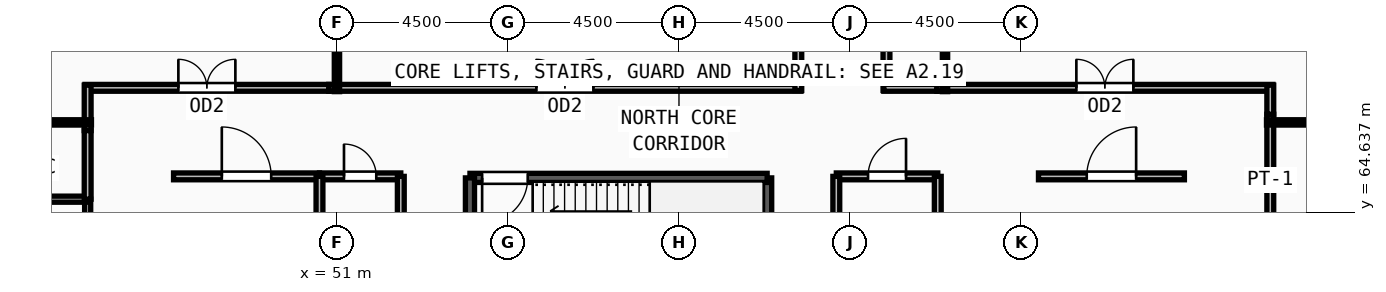
"""IFC4 building model, lengths in metres.
Left out: names, types, materials, properties, quantities, classifications, styles, units other than length and angle.
Written with IfcOpenShell. Run it as: python <this file> out.ifc"""

import sys

from ifc_helpers import new_model, si_unit, direction, frame, frame_2d, origin, place, context, subcontext, project, spatial, rectangle, extrude, source, transform, mapped, element, fill, save


model = new_model("IFC4")
c1 = context("Model", 3, precision=1e-05, world=origin(), true_north=direction((0.0, 1.0)))
c2 = subcontext(c1, "Body", "Model", "MODEL_VIEW")
j1 = project(units=[si_unit("LENGTHUNIT", "METRE"), si_unit("PLANEANGLEUNIT", "RADIAN")], contexts=[c1])
p1 = place(None, origin())
s1 = spatial("IfcSite", under=j1, at=p1, CompositionType="ELEMENT")
p2 = place(p1, origin())
s2 = spatial("IfcBuilding", under=s1, at=p2, CompositionType="ELEMENT")
p3 = place(p2, frame((0.0, 0.0, 194.25)))
s3 = spatial("IfcBuildingStorey", under=s2, at=p3, CompositionType="ELEMENT", Elevation=194.25)
p4 = place(p3, frame((62.32, 62.1, 0.0), z_axis=(0.0, 0.0, 1.0), x_axis=(0.0, 1.0, 0.0)))
e1 = element("IfcWall", 1, at=p4, inside=s3, PredefinedType="SOLIDWALL", context=c2, shape_type="SweptSolid", body=[
    extrude(rectangle(XDim=3.44, YDim=0.24, at=frame_2d((1.72, 0.0))), origin(), (0.0, 0.0, 1.0), 3.57),
])
p5 = place(p3, frame((62.32, 65.54, 0.0), z_axis=(0.0, 0.0, 1.0), x_axis=(-1.0, 0.0, 0.0)))
e2 = element("IfcWall", 2, at=p5, inside=s3, PredefinedType="SOLIDWALL", context=c2, shape_type="SweptSolid", body=[
    extrude(rectangle(XDim=7.82, YDim=0.24, at=frame_2d((3.91, 0.0))), origin(), (0.0, 0.0, 1.0), 3.57),
])
m1 = source(origin(), c2, "Body", "SweptSolid", [
    extrude(rectangle(XDim=1.2, YDim=2.2, at=frame_2d((0.6, 1.1))), frame((0.0, 0.13, 0.0), z_axis=(0.0, -1.0, 0.0), x_axis=(1.0, 0.0, 0.0)), (0.0, 0.0, 1.0), 0.26),
])
p6 = place(p5, frame((6.3, 0.0, 0.0)))
e3 = element("IfcOpeningElement", 3, at=p6, cuts=e2, PredefinedType="OPENING", context=c2, shape_type="MappedRepresentation", body=[
    mapped(m1, transform((0.0, 0.0, 0.0), x_axis=(1.0, 0.0, 0.0), y_axis=(0.0, 1.0, 0.0), z_axis=(0.0, 0.0, 1.0), scale=1.0)),
])
p7 = place(p3, frame((54.5, 65.54, 0.0), z_axis=(0.0, 0.0, 1.0), x_axis=(0.0, -1.0, 0.0)))
e4 = element("IfcWall", 4, at=p7, inside=s3, PredefinedType="SOLIDWALL", context=c2, shape_type="SweptSolid", body=[
    extrude(rectangle(XDim=3.44, YDim=0.24, at=frame_2d((1.72, 0.0))), origin(), (0.0, 0.0, 1.0), 3.57),
])
p8 = place(p3, frame((44.44, 62.24, 0.0), z_axis=(0.0, 0.0, 1.0), x_axis=(0.0, 1.0, 0.0)))
e5 = element("IfcWall", 5, at=p8, inside=s3, PredefinedType="PARTITIONING", context=c2, shape_type="SweptSolid", body=[
    extrude(rectangle(XDim=2.74, YDim=0.16, at=frame_2d((1.37, 0.0))), origin(), (0.0, 0.0, 1.0), 3.57),
])
m2 = source(origin(), c2, "Body", "SweptSolid", [
    extrude(rectangle(XDim=1.05, YDim=2.15, at=frame_2d((0.525, 1.075))), frame((0.0, 0.09, 0.0), z_axis=(0.0, -1.0, 0.0), x_axis=(1.0, 0.0, 0.0)), (0.0, 0.0, 1.0), 0.18),
])
p9 = place(p8, frame((0.845, 0.0, 0.0)))
e6 = element("IfcOpeningElement", 6, at=p9, cuts=e5, PredefinedType="OPENING", context=c2, shape_type="MappedRepresentation", body=[
    mapped(m2, transform((0.0, 0.0, 0.0), x_axis=(1.0, 0.0, 0.0), y_axis=(0.0, 1.0, 0.0), z_axis=(0.0, 0.0, 1.0), scale=1.0)),
])
p10 = place(p3, frame((50.54, 65.58, 0.0), z_axis=(0.0, 0.0, 1.0), x_axis=(1.0, 0.0, 0.0)))
e7 = element("IfcWall", 7, at=p10, inside=s3, PredefinedType="PARTITIONING", context=c2, shape_type="SweptSolid", body=[
    extrude(rectangle(XDim=2.14, YDim=0.18, at=frame_2d((1.07, 0.0))), origin(), (0.0, 0.0, 1.0), 3.57),
])
m3 = source(origin(), c2, "Body", "SweptSolid", [
    extrude(rectangle(XDim=0.85, YDim=2.1, at=frame_2d((0.425, 1.05))), frame((0.0, 0.1, 0.0), z_axis=(0.0, -1.0, 0.0), x_axis=(1.0, 0.0, 0.0)), (0.0, 0.0, 1.0), 0.2),
])
p11 = place(p10, frame((0.645, 0.0, 0.0)))
e8 = element("IfcOpeningElement", 8, at=p11, cuts=e7, PredefinedType="OPENING", context=c2, shape_type="MappedRepresentation", body=[
    mapped(m3, transform((0.0, 0.0, 0.0), x_axis=(1.0, 0.0, 0.0), y_axis=(0.0, 1.0, 0.0), z_axis=(0.0, 0.0, 1.0), scale=1.0)),
])
p12 = place(p3, frame((64.14, 65.58, 0.0), z_axis=(0.0, 0.0, 1.0), x_axis=(1.0, 0.0, 0.0)))
e9 = element("IfcWall", 9, at=p12, inside=s3, PredefinedType="PARTITIONING", context=c2, shape_type="SweptSolid", body=[
    extrude(rectangle(XDim=2.67, YDim=0.18, at=frame_2d((1.335, 0.0))), origin(), (0.0, 0.0, 1.0), 3.57),
])
m4 = source(origin(), c2, "Body", "SweptSolid", [
    extrude(rectangle(XDim=1.0, YDim=2.2, at=frame_2d((0.5, 1.1))), frame((0.0, 0.1, 0.0), z_axis=(0.0, -1.0, 0.0), x_axis=(1.0, 0.0, 0.0)), (0.0, 0.0, 1.0), 0.2),
])
p13 = place(p12, frame((0.835, 0.0, 0.0)))
e10 = element("IfcOpeningElement", 10, at=p13, cuts=e9, PredefinedType="OPENING", context=c2, shape_type="MappedRepresentation", body=[
    mapped(m4, transform((0.0, 0.0, 0.0), x_axis=(1.0, 0.0, 0.0), y_axis=(0.0, 1.0, 0.0), z_axis=(0.0, 0.0, 1.0), scale=1.0)),
])
p14 = place(p3, frame((46.7, 65.58, 0.0), z_axis=(0.0, 0.0, 1.0), x_axis=(1.0, 0.0, 0.0)))
e11 = element("IfcWall", 11, at=p14, inside=s3, PredefinedType="PARTITIONING", context=c2, shape_type="SweptSolid", body=[
    extrude(rectangle(XDim=3.84, YDim=0.18, at=frame_2d((1.92, 0.0))), origin(), (0.0, 0.0, 1.0), 3.57),
])
m5 = source(origin(), c2, "Body", "SweptSolid", [
    extrude(rectangle(XDim=1.3, YDim=2.2, at=frame_2d((0.65, 1.1))), frame((0.0, 0.1, 0.0), z_axis=(0.0, -1.0, 0.0), x_axis=(1.0, 0.0, 0.0)), (0.0, 0.0, 1.0), 0.2),
])
p15 = place(p14, frame((1.27, 0.0, 0.0)))
e12 = element("IfcOpeningElement", 12, at=p15, cuts=e11, PredefinedType="OPENING", context=c2, shape_type="MappedRepresentation", body=[
    mapped(m5, transform((0.0, 0.0, 0.0), x_axis=(1.0, 0.0, 0.0), y_axis=(0.0, 1.0, 0.0), z_axis=(0.0, 0.0, 1.0), scale=1.0)),
])
p16 = place(p3, frame((69.46, 65.58, 0.0), z_axis=(0.0, 0.0, 1.0), x_axis=(1.0, 0.0, 0.0)))
e13 = element("IfcWall", 13, at=p16, inside=s3, PredefinedType="PARTITIONING", context=c2, shape_type="SweptSolid", body=[
    extrude(rectangle(XDim=3.84, YDim=0.18, at=frame_2d((1.92, 0.0))), origin(), (0.0, 0.0, 1.0), 3.57),
])
p17 = place(p16, frame((1.27, 0.0, 0.0)))
e14 = element("IfcOpeningElement", 14, at=p17, cuts=e13, PredefinedType="OPENING", context=c2, shape_type="MappedRepresentation", body=[
    mapped(m5, transform((0.0, 0.0, 0.0), x_axis=(1.0, 0.0, 0.0), y_axis=(0.0, 1.0, 0.0), z_axis=(0.0, 0.0, 1.0), scale=1.0)),
])
p18 = place(p3, frame((75.56, 67.215, 0.0), z_axis=(0.0, 0.0, 1.0), x_axis=(0.0, -1.0, 0.0)))
e15 = element("IfcWall", 15, at=p18, inside=s3, PredefinedType="PARTITIONING", context=c2, shape_type="SweptSolid", body=[
    extrude(rectangle(XDim=8.93, YDim=0.18, at=frame_2d((4.465, 0.0))), origin(), (0.0, 0.0, 1.0), 3.57),
])
m6 = source(origin(), c2, "Body", "SweptSolid", [
    extrude(rectangle(XDim=1.5, YDim=2.2, at=frame_2d((0.75, 1.1))), frame((0.0, 0.1, 0.0), z_axis=(0.0, -1.0, 0.0), x_axis=(1.0, 0.0, 0.0)), (0.0, 0.0, 1.0), 0.2),
])
p19 = place(p18, frame((3.715, 0.0, 0.0)))
e16 = element("IfcOpeningElement", 16, at=p19, cuts=e15, PredefinedType="OPENING", context=c2, shape_type="MappedRepresentation", body=[
    mapped(m6, transform((0.0, 0.0, 0.0), x_axis=(1.0, 0.0, 0.0), y_axis=(0.0, 1.0, 0.0), z_axis=(0.0, 0.0, 1.0), scale=1.0)),
])
p20 = place(p3, frame((66.785, 67.91, 0.0), z_axis=(0.0, 0.0, 1.0), x_axis=(1.0, 0.0, 0.0)))
e17 = element("IfcWall", 17, at=p20, inside=s3, PredefinedType="PARTITIONING", context=c2, shape_type="SweptSolid", body=[
    extrude(rectangle(XDim=8.845, YDim=0.18, at=frame_2d((4.422, 0.0))), origin(), (0.0, 0.0, 1.0), 3.57),
])
p21 = place(p20, frame((3.672, 0.0, 0.0)))
e18 = element("IfcOpeningElement", 18, at=p21, cuts=e17, PredefinedType="OPENING", context=c2, shape_type="MappedRepresentation", body=[
    mapped(m6, transform((0.0, 0.0, 0.0), x_axis=(1.0, 0.0, 0.0), y_axis=(0.0, 1.0, 0.0), z_axis=(0.0, 0.0, 1.0), scale=1.0)),
])
p22 = place(p3, frame((65.46, 79.145, 0.0), z_axis=(0.0, 0.0, 1.0), x_axis=(0.0, -1.0, 0.0)))
e19 = element("IfcWall", 19, at=p22, inside=s3, PredefinedType="PARTITIONING", context=c2, shape_type="SweptSolid", body=[
    extrude(rectangle(XDim=11.305, YDim=0.18, at=frame_2d((5.652, 0.0))), origin(), (0.0, 0.0, 1.0), 3.57),
])
p23 = place(p22, frame((5.152, 0.0, 0.0)))
e20 = element("IfcOpeningElement", 20, at=p23, cuts=e19, PredefinedType="OPENING", context=c2, shape_type="MappedRepresentation", body=[
    mapped(m4, transform((0.0, 0.0, 0.0), x_axis=(1.0, 0.0, 0.0), y_axis=(0.0, 1.0, 0.0), z_axis=(0.0, 0.0, 1.0), scale=1.0)),
])
p24 = place(p3, frame((50.785, 67.91, 0.0), z_axis=(0.0, 0.0, 1.0), x_axis=(1.0, 0.0, 0.0)))
e21 = element("IfcWall", 21, at=p24, inside=s3, PredefinedType="PARTITIONING", context=c2, shape_type="SweptSolid", body=[
    extrude(rectangle(XDim=12.425, YDim=0.18, at=frame_2d((6.212, 0.0))), origin(), (0.0, 0.0, 1.0), 3.57),
])
p25 = place(p24, frame((5.463, 0.0, 0.0)))
e22 = element("IfcOpeningElement", 22, at=p25, cuts=e21, PredefinedType="OPENING", context=c2, shape_type="MappedRepresentation", body=[
    mapped(m6, transform((0.0, 0.0, 0.0), x_axis=(1.0, 0.0, 0.0), y_axis=(0.0, 1.0, 0.0), z_axis=(0.0, 0.0, 1.0), scale=1.0)),
])
p26 = place(p3, frame((44.37, 67.91, 0.0), z_axis=(0.0, 0.0, 1.0), x_axis=(1.0, 0.0, 0.0)))
e23 = element("IfcWall", 23, at=p26, inside=s3, PredefinedType="PARTITIONING", context=c2, shape_type="SweptSolid", body=[
    extrude(rectangle(XDim=6.415, YDim=0.18, at=frame_2d((3.208, 0.0))), origin(), (0.0, 0.0, 1.0), 3.57),
])
p27 = place(p26, frame((2.457, 0.0, 0.0)))
e24 = element("IfcOpeningElement", 24, at=p27, cuts=e23, PredefinedType="OPENING", context=c2, shape_type="MappedRepresentation", body=[
    mapped(m6, transform((0.0, 0.0, 0.0), x_axis=(1.0, 0.0, 0.0), y_axis=(0.0, 1.0, 0.0), z_axis=(0.0, 0.0, 1.0), scale=1.0)),
])
p28 = place(p3, frame((39.98, 64.98, 0.0), z_axis=(0.0, 0.0, 1.0), x_axis=(1.0, 0.0, 0.0)))
e25 = element("IfcWall", 25, at=p28, inside=s3, PredefinedType="PARTITIONING", context=c2, shape_type="SweptSolid", body=[
    extrude(rectangle(XDim=4.46, YDim=0.16, at=frame_2d((2.23, 0.0))), origin(), (0.0, 0.0, 1.0), 3.57),
])
p29 = place(p3, frame((50.54, 61.95, 0.0), z_axis=(0.0, 0.0, 1.0), x_axis=(0.0, 1.0, 0.0)))
e26 = element("IfcWall", 26, at=p29, inside=s3, PredefinedType="PARTITIONING", context=c2, shape_type="SweptSolid", body=[
    extrude(rectangle(XDim=3.63, YDim=0.18, at=frame_2d((1.815, 0.0))), origin(), (0.0, 0.0, 1.0), 3.57),
])
for number, where, z_axis, x_axis in (
    (27, (52.68, 61.825, 0.0), (0.0, 0.0, 1.0), (0.0, 1.0, 0.0)),
    (28, (64.14, 61.825, 0.0), (0.0, 0.0, 1.0), (0.0, 1.0, 0.0)),
    (29, (66.81, 61.825, 0.0), (0.0, 0.0, 1.0), (0.0, 1.0, 0.0)),
):
    element("IfcWall", number, at=place(p3, frame(where, z_axis=z_axis, x_axis=x_axis)), inside=s3, PredefinedType="PARTITIONING", context=c2, shape_type="SweptSolid", body=[
        extrude(rectangle(XDim=3.755, YDim=0.18, at=frame_2d((1.877, 0.0))), origin(), (0.0, 0.0, 1.0), 3.57),
    ])
p30 = place(p3, frame((75.56, 67.98, 0.0), z_axis=(0.0, 0.0, 1.0), x_axis=(0.0, -1.0, 0.0)))
e30 = element("IfcWall", 30, at=p30, inside=s3, PredefinedType="PARTITIONING", context=c2, shape_type="SweptSolid", body=[
    extrude(rectangle(XDim=0.765, YDim=0.18, at=frame_2d((0.382, 0.0))), origin(), (0.0, 0.0, 1.0), 3.57),
])
p31 = place(p3, frame((65.39, 67.91, 0.0), z_axis=(0.0, 0.0, 1.0), x_axis=(1.0, 0.0, 0.0)))
e31 = element("IfcWall", 31, at=p31, inside=s3, PredefinedType="PARTITIONING", context=c2, shape_type="SweptSolid", body=[
    extrude(rectangle(XDim=1.395, YDim=0.18, at=frame_2d((0.698, 0.0))), origin(), (0.0, 0.0, 1.0), 3.57),
])
p32 = place(p3, frame((63.14, 67.84, 0.0), z_axis=(0.0, 0.0, 1.0), x_axis=(0.0, 1.0, 0.0)))
e32 = element("IfcWall", 32, at=p32, inside=s3, PredefinedType="PARTITIONING", context=c2, shape_type="SweptSolid", body=[
    extrude(rectangle(XDim=11.475, YDim=0.18, at=frame_2d((5.737, 0.0))), origin(), (0.0, 0.0, 1.0), 3.57),
])
p33 = place(p3, frame((44.44, 66.785, 0.0), z_axis=(0.0, 0.0, 1.0), x_axis=(0.0, 1.0, 0.0)))
e33 = element("IfcWall", 33, at=p33, inside=s3, PredefinedType="PARTITIONING", context=c2, shape_type="SweptSolid", body=[
    extrude(rectangle(XDim=1.195, YDim=0.18, at=frame_2d((0.598, 0.0))), origin(), (0.0, 0.0, 1.0), 3.57),
])
p34 = place(p3, frame((44.44, 64.98, 0.0), z_axis=(0.0, 0.0, 1.0), x_axis=(0.0, 1.0, 0.0)))
e34 = element("IfcWall", 34, at=p34, inside=s3, PredefinedType="PARTITIONING", context=c2, shape_type="SweptSolid", body=[
    extrude(rectangle(XDim=1.805, YDim=0.18, at=frame_2d((0.902, 0.0))), origin(), (0.0, 0.0, 1.0), 3.57),
])
p35 = place(p3, frame((44.54, 67.0, 0.0), z_axis=(0.0, 0.0, 1.0), x_axis=(-1.0, 0.0, 0.0)))
e35 = element("IfcWall", 35, at=p35, inside=s3, PredefinedType="PARTITIONING", context=c2, shape_type="SweptSolid", body=[
    extrude(rectangle(XDim=19.227, YDim=0.14, at=frame_2d((9.614, 0.0))), origin(), (0.0, 0.0, 1.0), 2.855),
])
p36 = place(p3, frame((75.46, 67.0, 0.0), z_axis=(0.0, 0.0, 1.0), x_axis=(1.0, 0.0, 0.0)))
e36 = element("IfcWall", 36, at=p36, inside=s3, PredefinedType="PARTITIONING", context=c2, shape_type="SweptSolid", body=[
    extrude(rectangle(XDim=19.219, YDim=0.14, at=frame_2d((9.609, 0.0))), origin(), (0.0, 0.0, 1.0), 2.855),
])
p37 = place(p3, frame((51.0, 67.81, 0.0), z_axis=(0.0, 0.0, 1.0), x_axis=(0.0, 1.0, 0.0)))
e37 = element("IfcWall", 37, at=p37, inside=s3, PredefinedType="PARTITIONING", context=c2, shape_type="SweptSolid", body=[
    extrude(rectangle(XDim=10.922, YDim=0.14, at=frame_2d((5.461, 0.0))), origin(), (0.0, 0.0, 1.0), 3.57),
])
p38 = place(p3, frame((67.0, 67.81, 0.0), z_axis=(0.0, 0.0, 1.0), x_axis=(0.0, 1.0, 0.0)))
e38 = element("IfcWall", 38, at=p38, inside=s3, PredefinedType="PARTITIONING", context=c2, shape_type="SweptSolid", body=[
    extrude(rectangle(XDim=11.313, YDim=0.14, at=frame_2d((5.656, 0.0))), origin(), (0.0, 0.0, 1.0), 3.57),
])
m7 = source(origin(), c2, "Body", "SweptSolid", [
    extrude(rectangle(XDim=1.2, YDim=2.2, at=frame_2d((0.6, 1.1))), frame((0.0, 0.025, 0.0), z_axis=(0.0, -1.0, 0.0), x_axis=(1.0, 0.0, 0.0)), (0.0, 0.0, 1.0), 0.05),
])
p39 = place(p6, origin())
e39 = element("IfcDoor", 39, at=p39, inside=s3, OperationType="SINGLE_SWING_RIGHT", PredefinedType="DOOR", context=c2, shape_type="MappedRepresentation", body=[
    mapped(m7, transform((0.0, 0.0, 0.0), x_axis=(1.0, 0.0, 0.0), y_axis=(0.0, 1.0, 0.0), z_axis=(0.0, 0.0, 1.0), scale=1.0)),
])
fill(e3, e39)
m8 = source(origin(), c2, "Body", "SweptSolid", [
    extrude(rectangle(XDim=0.85, YDim=2.1, at=frame_2d((0.425, 1.05))), frame((0.0, 0.025, 0.0), z_axis=(0.0, -1.0, 0.0), x_axis=(1.0, 0.0, 0.0)), (0.0, 0.0, 1.0), 0.05),
])
p40 = place(p11, origin())
e40 = element("IfcDoor", 40, at=p40, inside=s3, OperationType="SINGLE_SWING_LEFT", PredefinedType="DOOR", context=c2, shape_type="MappedRepresentation", body=[
    mapped(m8, transform((0.0, 0.0, 0.0), x_axis=(1.0, 0.0, 0.0), y_axis=(0.0, 1.0, 0.0), z_axis=(0.0, 0.0, 1.0), scale=1.0)),
])
fill(e8, e40)
m9 = source(origin(), c2, "Body", "SweptSolid", [
    extrude(rectangle(XDim=1.0, YDim=2.2, at=frame_2d((0.5, 1.1))), frame((0.0, 0.025, 0.0), z_axis=(0.0, -1.0, 0.0), x_axis=(1.0, 0.0, 0.0)), (0.0, 0.0, 1.0), 0.05),
])
p41 = place(p13, origin())
e41 = element("IfcDoor", 41, at=p41, inside=s3, OperationType="SINGLE_SWING_RIGHT", PredefinedType="DOOR", context=c2, shape_type="MappedRepresentation", body=[
    mapped(m9, transform((0.0, 0.0, 0.0), x_axis=(1.0, 0.0, 0.0), y_axis=(0.0, 1.0, 0.0), z_axis=(0.0, 0.0, 1.0), scale=1.0)),
])
fill(e10, e41)
m10 = source(origin(), c2, "Body", "SweptSolid", [
    extrude(rectangle(XDim=1.3, YDim=2.2, at=frame_2d((0.65, 1.1))), frame((0.0, 0.025, 0.0), z_axis=(0.0, -1.0, 0.0), x_axis=(1.0, 0.0, 0.0)), (0.0, 0.0, 1.0), 0.05),
])
p42 = place(p15, origin())
e42 = element("IfcDoor", 42, at=p42, inside=s3, OperationType="SINGLE_SWING_LEFT", PredefinedType="DOOR", context=c2, shape_type="MappedRepresentation", body=[
    mapped(m10, transform((0.0, 0.0, 0.0), x_axis=(1.0, 0.0, 0.0), y_axis=(0.0, 1.0, 0.0), z_axis=(0.0, 0.0, 1.0), scale=1.0)),
])
fill(e12, e42)
p43 = place(p17, origin())
e43 = element("IfcDoor", 43, at=p43, inside=s3, OperationType="SINGLE_SWING_RIGHT", PredefinedType="DOOR", context=c2, shape_type="MappedRepresentation", body=[
    mapped(m10, transform((0.0, 0.0, 0.0), x_axis=(1.0, 0.0, 0.0), y_axis=(0.0, 1.0, 0.0), z_axis=(0.0, 0.0, 1.0), scale=1.0)),
])
fill(e14, e43)
m11 = source(origin(), c2, "Body", "SweptSolid", [
    extrude(rectangle(XDim=1.5, YDim=2.2, at=frame_2d((0.75, 1.1))), frame((0.0, 0.025, 0.0), z_axis=(0.0, -1.0, 0.0), x_axis=(1.0, 0.0, 0.0)), (0.0, 0.0, 1.0), 0.05),
])
p44 = place(p21, origin())
e44 = element("IfcDoor", 44, at=p44, inside=s3, OperationType="DOUBLE_DOOR_SINGLE_SWING", PredefinedType="DOOR", context=c2, shape_type="MappedRepresentation", body=[
    mapped(m11, transform((0.0, 0.0, 0.0), x_axis=(1.0, 0.0, 0.0), y_axis=(0.0, 1.0, 0.0), z_axis=(0.0, 0.0, 1.0), scale=1.0)),
])
fill(e18, e44)
p45 = place(p25, origin())
e45 = element("IfcDoor", 45, at=p45, inside=s3, OperationType="DOUBLE_DOOR_SINGLE_SWING", PredefinedType="DOOR", context=c2, shape_type="MappedRepresentation", body=[
    mapped(m11, transform((0.0, 0.0, 0.0), x_axis=(1.0, 0.0, 0.0), y_axis=(0.0, 1.0, 0.0), z_axis=(0.0, 0.0, 1.0), scale=1.0)),
])
fill(e22, e45)
p46 = place(p27, origin())
e46 = element("IfcDoor", 46, at=p46, inside=s3, OperationType="DOUBLE_DOOR_SINGLE_SWING", PredefinedType="DOOR", context=c2, shape_type="MappedRepresentation", body=[
    mapped(m11, transform((0.0, 0.0, 0.0), x_axis=(1.0, 0.0, 0.0), y_axis=(0.0, 1.0, 0.0), z_axis=(0.0, 0.0, 1.0), scale=1.0)),
])
fill(e24, e46)
save(model, sys.argv[1])
